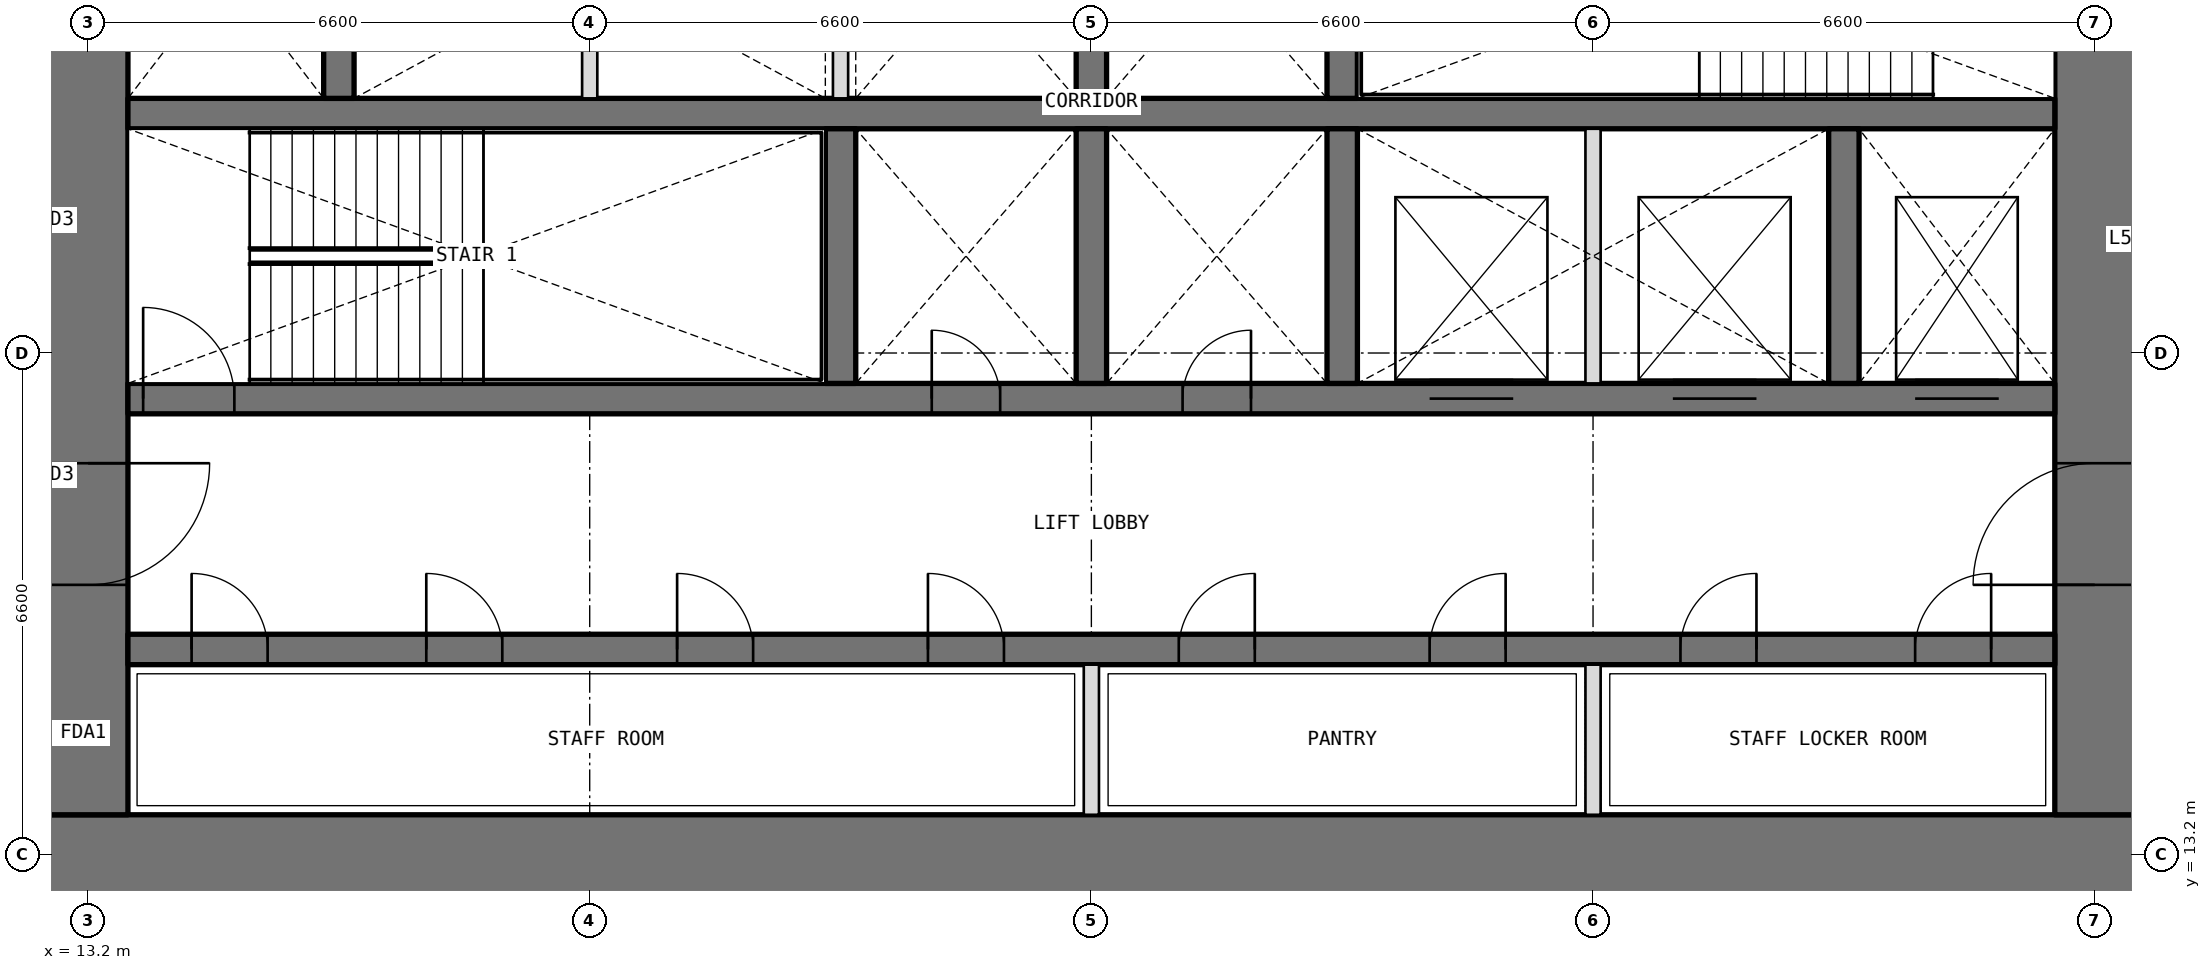
"""IFC4 building model, lengths in metres.
Left out: names, types, materials, properties, quantities, classifications, styles, units other than length and angle.
Written with IfcOpenShell. Run it as: python <this file> out.ifc"""

import sys

from ifc_helpers import new_model, si_unit, direction, frame, frame_2d, origin, place, context, subcontext, project, spatial, rectangle, extrude, element, fill, save


model = new_model("IFC4")
c1 = context("Model", 3, precision=1e-05, world=origin(), true_north=direction((0.0, 1.0)))
c2 = subcontext(c1, "Body", "Model", "MODEL_VIEW")
j1 = project(units=[si_unit("LENGTHUNIT", "METRE"), si_unit("PLANEANGLEUNIT", "RADIAN")], contexts=[c1])
p1 = place(None, origin())
s1 = spatial("IfcSite", under=j1, at=p1, CompositionType="ELEMENT")
p2 = place(p1, origin())
s2 = spatial("IfcBuilding", under=s1, at=p2, CompositionType="ELEMENT")
p3 = place(p2, frame((0.0, 0.0, 246.0)))
s3 = spatial("IfcBuildingStorey", under=s2, at=p3, CompositionType="ELEMENT", Elevation=246.0)
p4 = place(p3, frame((12.675, 13.2, 0.0), z_axis=(0.0, 0.0, 1.0), x_axis=(1.0, 0.0, 0.0)))
e1 = element("IfcWall", 1, at=p4, inside=s3, PredefinedType="SHEAR", context=c2, shape_type="SweptSolid", body=[
    extrude(rectangle(XDim=27.45, YDim=1.05, at=frame_2d((13.725, 0.0))), origin(), (0.0, 0.0, 1.0), 4.2),
])
p5 = place(p3, frame((39.6, 13.725, 0.0), z_axis=(0.0, 0.0, 1.0), x_axis=(0.0, 1.0, 0.0)))
e2 = element("IfcWall", 2, at=p5, inside=s3, PredefinedType="SHEAR", context=c2, shape_type="SweptSolid", body=[
    extrude(rectangle(XDim=18.75, YDim=1.05, at=frame_2d((9.375, 0.0))), origin(), (0.0, 0.0, 1.0), 4.2),
])
p6 = place(p5, frame((3.025, 0.0, 0.0)))
e3 = element("IfcOpeningElement", 3, at=p6, cuts=e2, PredefinedType="OPENING", context=c2, shape_type="SweptSolid", body=[
    extrude(rectangle(XDim=1.6, YDim=2.1, at=frame_2d((0.8, 1.05))), frame((0.0, 0.535, 0.0), z_axis=(0.0, -1.0, 0.0), x_axis=(1.0, 0.0, 0.0)), (0.0, 0.0, 1.0), 1.07),
])
p7 = place(p5, frame((13.825, 0.0, 0.0)))
e4 = element("IfcOpeningElement", 4, at=p7, cuts=e2, PredefinedType="OPENING", context=c2, shape_type="SweptSolid", body=[
    extrude(rectangle(XDim=1.6, YDim=2.1, at=frame_2d((0.8, 1.05))), frame((0.0, 0.535, 0.0), z_axis=(0.0, -1.0, 0.0), x_axis=(1.0, 0.0, 0.0)), (0.0, 0.0, 1.0), 1.07),
])
p8 = place(p3, frame((13.2, 32.475, 0.0), z_axis=(0.0, 0.0, 1.0), x_axis=(0.0, -1.0, 0.0)))
e5 = element("IfcWall", 5, at=p8, inside=s3, PredefinedType="SHEAR", context=c2, shape_type="SweptSolid", body=[
    extrude(rectangle(XDim=18.75, YDim=1.05, at=frame_2d((9.375, 0.0))), origin(), (0.0, 0.0, 1.0), 4.2),
])
p9 = place(p8, frame((14.125, 0.0, 0.0)))
e6 = element("IfcOpeningElement", 6, at=p9, cuts=e5, PredefinedType="OPENING", context=c2, shape_type="SweptSolid", body=[
    extrude(rectangle(XDim=1.6, YDim=2.1, at=frame_2d((0.8, 1.05))), frame((0.0, 0.535, 0.0), z_axis=(0.0, -1.0, 0.0), x_axis=(1.0, 0.0, 0.0)), (0.0, 0.0, 1.0), 1.07),
])
p10 = place(p8, frame((3.325, 0.0, 0.0)))
e7 = element("IfcOpeningElement", 7, at=p10, cuts=e5, PredefinedType="OPENING", context=c2, shape_type="SweptSolid", body=[
    extrude(rectangle(XDim=1.6, YDim=2.1, at=frame_2d((0.8, 1.05))), frame((0.0, 0.535, 0.0), z_axis=(0.0, -1.0, 0.0), x_axis=(1.0, 0.0, 0.0)), (0.0, 0.0, 1.0), 1.07),
])
p11 = place(p3, frame((13.725, 15.9, 0.0), z_axis=(0.0, 0.0, 1.0), x_axis=(1.0, 0.0, 0.0)))
e8 = element("IfcWall", 8, at=p11, inside=s3, PredefinedType="SHEAR", context=c2, shape_type="SweptSolid", body=[
    extrude(rectangle(XDim=25.35, YDim=0.4, at=frame_2d((12.675, 0.0))), origin(), (0.0, 0.0, 1.0), 4.2),
])
p12 = place(p11, frame((0.837, 0.0, 0.0)))
e9 = element("IfcOpeningElement", 9, at=p12, cuts=e8, PredefinedType="OPENING", context=c2, shape_type="SweptSolid", body=[
    extrude(rectangle(XDim=1.0, YDim=2.1, at=frame_2d((0.5, 1.05))), frame((0.0, 0.21, 0.0), z_axis=(0.0, -1.0, 0.0), x_axis=(1.0, 0.0, 0.0)), (0.0, 0.0, 1.0), 0.42),
])
p13 = place(p11, frame((3.925, 0.0, 0.0)))
e10 = element("IfcOpeningElement", 10, at=p13, cuts=e8, PredefinedType="OPENING", context=c2, shape_type="SweptSolid", body=[
    extrude(rectangle(XDim=1.0, YDim=2.1, at=frame_2d((0.5, 1.05))), frame((0.0, 0.21, 0.0), z_axis=(0.0, -1.0, 0.0), x_axis=(1.0, 0.0, 0.0)), (0.0, 0.0, 1.0), 0.42),
])
p14 = place(p11, frame((7.225, 0.0, 0.0)))
e11 = element("IfcOpeningElement", 11, at=p14, cuts=e8, PredefinedType="OPENING", context=c2, shape_type="SweptSolid", body=[
    extrude(rectangle(XDim=1.0, YDim=2.1, at=frame_2d((0.5, 1.05))), frame((0.0, 0.21, 0.0), z_axis=(0.0, -1.0, 0.0), x_axis=(1.0, 0.0, 0.0)), (0.0, 0.0, 1.0), 0.42),
])
p15 = place(p11, frame((10.525, 0.0, 0.0)))
e12 = element("IfcOpeningElement", 12, at=p15, cuts=e8, PredefinedType="OPENING", context=c2, shape_type="SweptSolid", body=[
    extrude(rectangle(XDim=1.0, YDim=2.1, at=frame_2d((0.5, 1.05))), frame((0.0, 0.21, 0.0), z_axis=(0.0, -1.0, 0.0), x_axis=(1.0, 0.0, 0.0)), (0.0, 0.0, 1.0), 0.42),
])
p16 = place(p11, frame((13.825, 0.0, 0.0)))
e13 = element("IfcOpeningElement", 13, at=p16, cuts=e8, PredefinedType="OPENING", context=c2, shape_type="SweptSolid", body=[
    extrude(rectangle(XDim=1.0, YDim=2.1, at=frame_2d((0.5, 1.05))), frame((0.0, 0.21, 0.0), z_axis=(0.0, -1.0, 0.0), x_axis=(1.0, 0.0, 0.0)), (0.0, 0.0, 1.0), 0.42),
])
p17 = place(p11, frame((17.125, 0.0, 0.0)))
e14 = element("IfcOpeningElement", 14, at=p17, cuts=e8, PredefinedType="OPENING", context=c2, shape_type="SweptSolid", body=[
    extrude(rectangle(XDim=1.0, YDim=2.1, at=frame_2d((0.5, 1.05))), frame((0.0, 0.21, 0.0), z_axis=(0.0, -1.0, 0.0), x_axis=(1.0, 0.0, 0.0)), (0.0, 0.0, 1.0), 0.42),
])
p18 = place(p11, frame((20.425, 0.0, 0.0)))
e15 = element("IfcOpeningElement", 15, at=p18, cuts=e8, PredefinedType="OPENING", context=c2, shape_type="SweptSolid", body=[
    extrude(rectangle(XDim=1.0, YDim=2.1, at=frame_2d((0.5, 1.05))), frame((0.0, 0.21, 0.0), z_axis=(0.0, -1.0, 0.0), x_axis=(1.0, 0.0, 0.0)), (0.0, 0.0, 1.0), 0.42),
])
p19 = place(p11, frame((23.512, 0.0, 0.0)))
e16 = element("IfcOpeningElement", 16, at=p19, cuts=e8, PredefinedType="OPENING", context=c2, shape_type="SweptSolid", body=[
    extrude(rectangle(XDim=1.0, YDim=2.1, at=frame_2d((0.5, 1.05))), frame((0.0, 0.21, 0.0), z_axis=(0.0, -1.0, 0.0), x_axis=(1.0, 0.0, 0.0)), (0.0, 0.0, 1.0), 0.42),
])
p20 = place(p3, frame((13.725, 19.2, 0.0), z_axis=(0.0, 0.0, 1.0), x_axis=(1.0, 0.0, 0.0)))
e17 = element("IfcWall", 17, at=p20, inside=s3, PredefinedType="SHEAR", context=c2, shape_type="SweptSolid", body=[
    extrude(rectangle(XDim=25.35, YDim=0.4, at=frame_2d((12.675, 0.0))), origin(), (0.0, 0.0, 1.0), 4.2),
])
p21 = place(p20, frame((10.575, 0.0, 0.0)))
e18 = element("IfcOpeningElement", 18, at=p21, cuts=e17, PredefinedType="OPENING", context=c2, shape_type="SweptSolid", body=[
    extrude(rectangle(XDim=0.9, YDim=2.1, at=frame_2d((0.45, 1.05))), frame((0.0, 0.21, 0.0), z_axis=(0.0, -1.0, 0.0), x_axis=(1.0, 0.0, 0.0)), (0.0, 0.0, 1.0), 0.42),
])
p22 = place(p20, frame((13.875, 0.0, 0.0)))
e19 = element("IfcOpeningElement", 19, at=p22, cuts=e17, PredefinedType="OPENING", context=c2, shape_type="SweptSolid", body=[
    extrude(rectangle(XDim=0.9, YDim=2.1, at=frame_2d((0.45, 1.05))), frame((0.0, 0.21, 0.0), z_axis=(0.0, -1.0, 0.0), x_axis=(1.0, 0.0, 0.0)), (0.0, 0.0, 1.0), 0.42),
])
p23 = place(p20, frame((0.2, 0.0, 0.0)))
e20 = element("IfcOpeningElement", 20, at=p23, cuts=e17, PredefinedType="OPENING", context=c2, shape_type="SweptSolid", body=[
    extrude(rectangle(XDim=1.2, YDim=2.1, at=frame_2d((0.6, 1.05))), frame((0.0, 0.21, 0.0), z_axis=(0.0, -1.0, 0.0), x_axis=(1.0, 0.0, 0.0)), (0.0, 0.0, 1.0), 0.42),
])
p24 = place(p20, frame((23.512, 0.0, 0.0)))
e21 = element("IfcOpeningElement", 21, at=p24, cuts=e17, PredefinedType="OPENING", context=c2, shape_type="SweptSolid", body=[
    extrude(rectangle(XDim=1.1, YDim=2.1, at=frame_2d((0.55, 1.05))), frame((0.0, 0.21, 0.0), z_axis=(0.0, -1.0, 0.0), x_axis=(1.0, 0.0, 0.0)), (0.0, 0.0, 1.0), 0.42),
])
p25 = place(p20, frame((17.125, 0.0, 0.0)))
e22 = element("IfcOpeningElement", 22, at=p25, cuts=e17, PredefinedType="OPENING", context=c2, shape_type="SweptSolid", body=[
    extrude(rectangle(XDim=1.1, YDim=2.1, at=frame_2d((0.55, 1.05))), frame((0.0, 0.21, 0.0), z_axis=(0.0, -1.0, 0.0), x_axis=(1.0, 0.0, 0.0)), (0.0, 0.0, 1.0), 0.42),
])
p26 = place(p20, frame((20.325, 0.0, 0.0)))
e23 = element("IfcOpeningElement", 23, at=p26, cuts=e17, PredefinedType="OPENING", context=c2, shape_type="SweptSolid", body=[
    extrude(rectangle(XDim=1.1, YDim=2.1, at=frame_2d((0.55, 1.05))), frame((0.0, 0.21, 0.0), z_axis=(0.0, -1.0, 0.0), x_axis=(1.0, 0.0, 0.0)), (0.0, 0.0, 1.0), 0.42),
])
p27 = place(p3, frame((13.725, 22.95, 0.0), z_axis=(0.0, 0.0, 1.0), x_axis=(1.0, 0.0, 0.0)))
e24 = element("IfcWall", 24, at=p27, inside=s3, PredefinedType="SHEAR", context=c2, shape_type="SweptSolid", body=[
    extrude(rectangle(XDim=25.35, YDim=0.4, at=frame_2d((12.675, 0.0))), origin(), (0.0, 0.0, 1.0), 4.2),
])
for number, where, z_axis, x_axis in (
    (25, (23.1, 19.4, 0.0), (0.0, 0.0, 1.0), (0.0, 1.0, 0.0)),
    (26, (26.4, 19.4, 0.0), (0.0, 0.0, 1.0), (0.0, 1.0, 0.0)),
    (27, (29.7, 19.4, 0.0), (0.0, 0.0, 1.0), (0.0, 1.0, 0.0)),
    (28, (36.3, 19.4, 0.0), (0.0, 0.0, 1.0), (0.0, 1.0, 0.0)),
    (29, (16.5, 23.15, 0.0), (0.0, 0.0, 1.0), (0.0, 1.0, 0.0)),
    (30, (26.4, 23.15, 0.0), (0.0, 0.0, 1.0), (0.0, 1.0, 0.0)),
    (31, (29.7, 23.15, 0.0), (0.0, 0.0, 1.0), (0.0, 1.0, 0.0)),
):
    element("IfcWall", number, at=place(p3, frame(where, z_axis=z_axis, x_axis=x_axis)), inside=s3, PredefinedType="SHEAR", context=c2, shape_type="SweptSolid", body=[
        extrude(rectangle(XDim=3.35, YDim=0.4, at=frame_2d((1.675, 0.0))), origin(), (0.0, 0.0, 1.0), 4.2),
    ])
for number, where, z_axis, x_axis in (
    (32, (26.4, 13.725, 0.0), (0.0, 0.0, 1.0), (0.0, 1.0, 0.0)),
    (33, (33.0, 13.725, 0.0), (0.0, 0.0, 1.0), (0.0, 1.0, 0.0)),
):
    element("IfcWall", number, at=place(p3, frame(where, z_axis=z_axis, x_axis=x_axis)), inside=s3, PredefinedType="PARTITIONING", context=c2, shape_type="SweptSolid", body=[
        extrude(rectangle(XDim=1.975, YDim=0.2, at=frame_2d((0.987, 0.0))), origin(), (0.0, 0.0, 1.0), 4.2),
    ])
for number, where, z_axis, x_axis in (
    (34, (33.0, 19.4, 0.0), (0.0, 0.0, 1.0), (0.0, 1.0, 0.0)),
    (35, (19.8, 23.15, 0.0), (0.0, 0.0, 1.0), (0.0, 1.0, 0.0)),
    (36, (23.1, 23.15, 0.0), (0.0, 0.0, 1.0), (0.0, 1.0, 0.0)),
):
    element("IfcWall", number, at=place(p3, frame(where, z_axis=z_axis, x_axis=x_axis)), inside=s3, PredefinedType="PARTITIONING", context=c2, shape_type="SweptSolid", body=[
        extrude(rectangle(XDim=3.35, YDim=0.2, at=frame_2d((1.675, 0.0))), origin(), (0.0, 0.0, 1.0), 4.2),
    ])
p28 = place(p21, origin())
e37 = element("IfcDoor", 37, at=p28, inside=s3, OperationType="SINGLE_SWING_LEFT", PredefinedType="DOOR", context=c2, shape_type="SweptSolid", body=[
    extrude(rectangle(XDim=0.9, YDim=2.1, at=frame_2d((0.45, 1.05))), frame((0.0, 0.025, 0.0), z_axis=(0.0, -1.0, 0.0), x_axis=(1.0, 0.0, 0.0)), (0.0, 0.0, 1.0), 0.05),
])
fill(e18, e37)
p29 = place(p22, origin())
e38 = element("IfcDoor", 38, at=p29, inside=s3, OperationType="SINGLE_SWING_RIGHT", PredefinedType="DOOR", context=c2, shape_type="SweptSolid", body=[
    extrude(rectangle(XDim=0.9, YDim=2.1, at=frame_2d((0.45, 1.05))), frame((0.0, 0.025, 0.0), z_axis=(0.0, -1.0, 0.0), x_axis=(1.0, 0.0, 0.0)), (0.0, 0.0, 1.0), 0.05),
])
fill(e19, e38)
p30 = place(p12, origin())
e39 = element("IfcDoor", 39, at=p30, inside=s3, OperationType="SINGLE_SWING_LEFT", PredefinedType="DOOR", context=c2, shape_type="SweptSolid", body=[
    extrude(rectangle(XDim=1.0, YDim=2.1, at=frame_2d((0.5, 1.05))), frame((0.0, 0.025, 0.0), z_axis=(0.0, -1.0, 0.0), x_axis=(1.0, 0.0, 0.0)), (0.0, 0.0, 1.0), 0.05),
])
fill(e9, e39)
p31 = place(p13, origin())
e40 = element("IfcDoor", 40, at=p31, inside=s3, OperationType="SINGLE_SWING_LEFT", PredefinedType="DOOR", context=c2, shape_type="SweptSolid", body=[
    extrude(rectangle(XDim=1.0, YDim=2.1, at=frame_2d((0.5, 1.05))), frame((0.0, 0.025, 0.0), z_axis=(0.0, -1.0, 0.0), x_axis=(1.0, 0.0, 0.0)), (0.0, 0.0, 1.0), 0.05),
])
fill(e10, e40)
p32 = place(p14, origin())
e41 = element("IfcDoor", 41, at=p32, inside=s3, OperationType="SINGLE_SWING_LEFT", PredefinedType="DOOR", context=c2, shape_type="SweptSolid", body=[
    extrude(rectangle(XDim=1.0, YDim=2.1, at=frame_2d((0.5, 1.05))), frame((0.0, 0.025, 0.0), z_axis=(0.0, -1.0, 0.0), x_axis=(1.0, 0.0, 0.0)), (0.0, 0.0, 1.0), 0.05),
])
fill(e11, e41)
p33 = place(p15, origin())
e42 = element("IfcDoor", 42, at=p33, inside=s3, OperationType="SINGLE_SWING_LEFT", PredefinedType="DOOR", context=c2, shape_type="SweptSolid", body=[
    extrude(rectangle(XDim=1.0, YDim=2.1, at=frame_2d((0.5, 1.05))), frame((0.0, 0.025, 0.0), z_axis=(0.0, -1.0, 0.0), x_axis=(1.0, 0.0, 0.0)), (0.0, 0.0, 1.0), 0.05),
])
fill(e12, e42)
p34 = place(p16, origin())
e43 = element("IfcDoor", 43, at=p34, inside=s3, OperationType="SINGLE_SWING_RIGHT", PredefinedType="DOOR", context=c2, shape_type="SweptSolid", body=[
    extrude(rectangle(XDim=1.0, YDim=2.1, at=frame_2d((0.5, 1.05))), frame((0.0, 0.025, 0.0), z_axis=(0.0, -1.0, 0.0), x_axis=(1.0, 0.0, 0.0)), (0.0, 0.0, 1.0), 0.05),
])
fill(e13, e43)
p35 = place(p17, origin())
e44 = element("IfcDoor", 44, at=p35, inside=s3, OperationType="SINGLE_SWING_RIGHT", PredefinedType="DOOR", context=c2, shape_type="SweptSolid", body=[
    extrude(rectangle(XDim=1.0, YDim=2.1, at=frame_2d((0.5, 1.05))), frame((0.0, 0.025, 0.0), z_axis=(0.0, -1.0, 0.0), x_axis=(1.0, 0.0, 0.0)), (0.0, 0.0, 1.0), 0.05),
])
fill(e14, e44)
p36 = place(p18, origin())
e45 = element("IfcDoor", 45, at=p36, inside=s3, OperationType="SINGLE_SWING_RIGHT", PredefinedType="DOOR", context=c2, shape_type="SweptSolid", body=[
    extrude(rectangle(XDim=1.0, YDim=2.1, at=frame_2d((0.5, 1.05))), frame((0.0, 0.025, 0.0), z_axis=(0.0, -1.0, 0.0), x_axis=(1.0, 0.0, 0.0)), (0.0, 0.0, 1.0), 0.05),
])
fill(e15, e45)
p37 = place(p19, origin())
e46 = element("IfcDoor", 46, at=p37, inside=s3, OperationType="SINGLE_SWING_RIGHT", PredefinedType="DOOR", context=c2, shape_type="SweptSolid", body=[
    extrude(rectangle(XDim=1.0, YDim=2.1, at=frame_2d((0.5, 1.05))), frame((0.0, 0.025, 0.0), z_axis=(0.0, -1.0, 0.0), x_axis=(1.0, 0.0, 0.0)), (0.0, 0.0, 1.0), 0.05),
])
fill(e16, e46)
p38 = place(p23, origin())
e47 = element("IfcDoor", 47, at=p38, inside=s3, OperationType="SINGLE_SWING_LEFT", PredefinedType="DOOR", context=c2, shape_type="SweptSolid", body=[
    extrude(rectangle(XDim=1.2, YDim=2.1, at=frame_2d((0.6, 1.05))), frame((0.0, 0.025, 0.0), z_axis=(0.0, -1.0, 0.0), x_axis=(1.0, 0.0, 0.0)), (0.0, 0.0, 1.0), 0.05),
])
fill(e20, e47)
p39 = place(p9, origin())
e48 = element("IfcDoor", 48, at=p39, inside=s3, OperationType="DOUBLE_DOOR_DOUBLE_SWING", PredefinedType="DOOR", context=c2, shape_type="SweptSolid", body=[
    extrude(rectangle(XDim=1.6, YDim=2.1, at=frame_2d((0.8, 1.05))), frame((0.0, 0.025, 0.0), z_axis=(0.0, -1.0, 0.0), x_axis=(1.0, 0.0, 0.0)), (0.0, 0.0, 1.0), 0.05),
])
fill(e6, e48)
p40 = place(p6, origin())
e49 = element("IfcDoor", 49, at=p40, inside=s3, OperationType="DOUBLE_DOOR_DOUBLE_SWING", PredefinedType="DOOR", context=c2, shape_type="SweptSolid", body=[
    extrude(rectangle(XDim=1.6, YDim=2.1, at=frame_2d((0.8, 1.05))), frame((0.0, 0.025, 0.0), z_axis=(0.0, -1.0, 0.0), x_axis=(1.0, 0.0, 0.0)), (0.0, 0.0, 1.0), 0.05),
])
fill(e3, e49)
p41 = place(p24, origin())
e50 = element("IfcDoor", 50, at=p41, inside=s3, OperationType="DOUBLE_DOOR_SLIDING", PredefinedType="DOOR", context=c2, shape_type="SweptSolid", body=[
    extrude(rectangle(XDim=1.1, YDim=2.1, at=frame_2d((0.55, 1.05))), frame((0.0, 0.025, 0.0), z_axis=(0.0, -1.0, 0.0), x_axis=(1.0, 0.0, 0.0)), (0.0, 0.0, 1.0), 0.05),
])
fill(e21, e50)
p42 = place(p25, origin())
e51 = element("IfcDoor", 51, at=p42, inside=s3, OperationType="DOUBLE_DOOR_SLIDING", PredefinedType="DOOR", context=c2, shape_type="SweptSolid", body=[
    extrude(rectangle(XDim=1.1, YDim=2.1, at=frame_2d((0.55, 1.05))), frame((0.0, 0.025, 0.0), z_axis=(0.0, -1.0, 0.0), x_axis=(1.0, 0.0, 0.0)), (0.0, 0.0, 1.0), 0.05),
])
fill(e22, e51)
p43 = place(p26, origin())
e52 = element("IfcDoor", 52, at=p43, inside=s3, OperationType="DOUBLE_DOOR_SLIDING", PredefinedType="DOOR", context=c2, shape_type="SweptSolid", body=[
    extrude(rectangle(XDim=1.1, YDim=2.1, at=frame_2d((0.55, 1.05))), frame((0.0, 0.025, 0.0), z_axis=(0.0, -1.0, 0.0), x_axis=(1.0, 0.0, 0.0)), (0.0, 0.0, 1.0), 0.05),
])
fill(e23, e52)
save(model, sys.argv[1])
